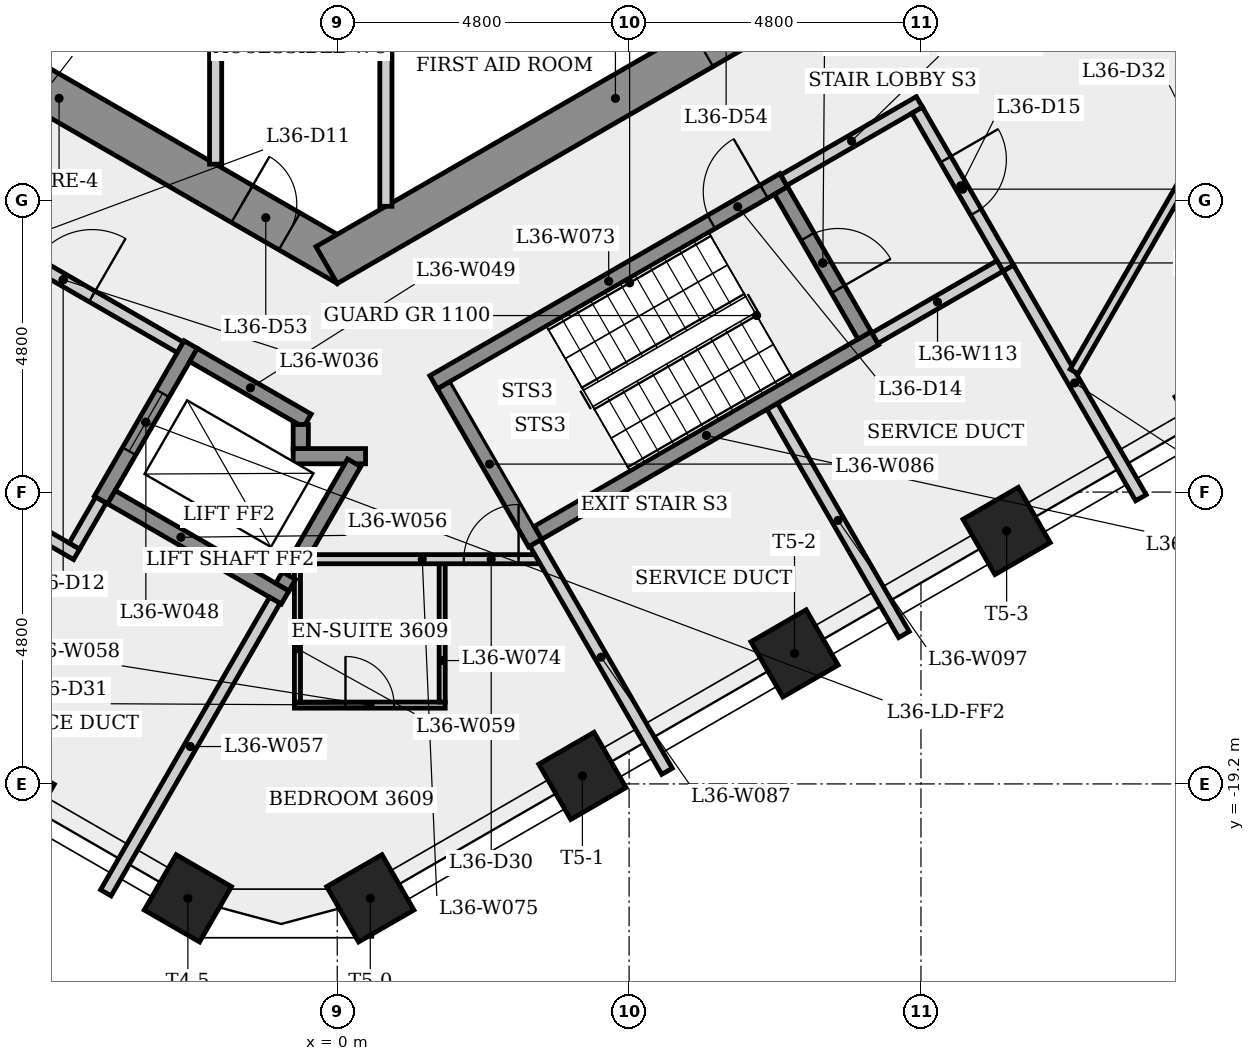
"""IFC4 building model, lengths in metres.
Left out: names, types, materials, properties, quantities, classifications, styles, units other than length and angle.
Written with IfcOpenShell. Run it as: python <this file> out.ifc"""

import sys

from ifc_helpers import new_model, si_unit, direction, frame, frame_2d, origin, origin_2d, place, context, subcontext, project, spatial, rectangle, extrude, element, fill, save


model = new_model("IFC4")
c1 = context("Model", 3, precision=1e-05, world=origin(), true_north=direction((0.0, 1.0)))
c2 = subcontext(c1, "Body", "Model", "MODEL_VIEW")
j1 = project(units=[si_unit("LENGTHUNIT", "METRE"), si_unit("PLANEANGLEUNIT", "RADIAN")], contexts=[c1])
p1 = place(None, origin())
s1 = spatial("IfcSite", under=j1, at=p1, CompositionType="ELEMENT")
p2 = place(p1, origin())
s2 = spatial("IfcBuilding", under=s1, at=p2, CompositionType="ELEMENT")
p3 = place(p2, frame((0.0, 0.0, 135.9)))
s3 = spatial("IfcBuildingStorey", under=s2, at=p3, CompositionType="ELEMENT", Elevation=135.9)
p4 = place(p3, frame((-9.325, -5.182, 0.0), z_axis=(0.0, 0.0, 1.0), x_axis=(0.866023993627, -0.500002442456, 0.0)))
e1 = element("IfcWall", 1, at=p4, inside=s3, PredefinedType="SHEAR", context=c2, shape_type="SweptSolid", body=[
    extrude(rectangle(XDim=10.97, YDim=0.7, at=frame_2d((5.485, 0.0))), origin(), (0.0, 0.0, 1.0), 4.0),
])
p5 = place(p4, frame((2.239, 0.0, 0.0)))
e2 = element("IfcOpeningElement", 2, at=p5, cuts=e1, PredefinedType="OPENING", context=c2, shape_type="SweptSolid", body=[
    extrude(rectangle(XDim=0.9, YDim=2.1, at=frame_2d((0.45, 1.05))), frame((0.0, 0.36, 0.0), z_axis=(0.0, -1.0, 0.0), x_axis=(1.0, 0.0, 0.0)), (0.0, 0.0, 1.0), 0.72),
])
p6 = place(p4, frame((8.96, 0.0, 0.0)))
e3 = element("IfcOpeningElement", 3, at=p6, cuts=e1, PredefinedType="OPENING", context=c2, shape_type="SweptSolid", body=[
    extrude(rectangle(XDim=0.9, YDim=2.1, at=frame_2d((0.45, 1.05))), frame((0.0, 0.36, 0.0), z_axis=(0.0, -1.0, 0.0), x_axis=(1.0, 0.0, 0.0)), (0.0, 0.0, 1.0), 0.72),
])
p7 = place(p3, frame((-0.175, -10.667, 0.0), z_axis=(0.0, 0.0, 1.0), x_axis=(0.866023993627, 0.500002442456, 0.0)))
e4 = element("IfcWall", 4, at=p7, inside=s3, PredefinedType="SHEAR", context=c2, shape_type="SweptSolid", body=[
    extrude(rectangle(XDim=10.97, YDim=0.7, at=frame_2d((5.485, 0.0))), origin(), (0.0, 0.0, 1.0), 4.0),
])
p8 = place(p7, frame((7.137, 0.0, 0.0)))
e5 = element("IfcOpeningElement", 5, at=p8, cuts=e4, PredefinedType="OPENING", context=c2, shape_type="SweptSolid", body=[
    extrude(rectangle(XDim=0.9, YDim=2.1, at=frame_2d((0.45, 1.05))), frame((0.0, 0.36, 0.0), z_axis=(0.0, -1.0, 0.0), x_axis=(1.0, 0.0, 0.0)), (0.0, 0.0, 1.0), 0.72),
])
for number, where, z_axis, x_axis in (
    (6, (-5.371, -19.399, 0.0), (0.0, 0.0, 1.0), (-0.5, -0.866, 0.0)),
    (7, (-2.457, -21.082, 0.0), (0.0, 0.0, 1.0), (-0.5, -0.866, 0.0)),
    (8, (0.543, -21.082, 0.0), (0.0, 0.0, 1.0), (0.5, -0.866, 0.0)),
    (9, (4.032, -19.068, 0.0), (0.0, 0.0, 1.0), (0.5, -0.866, 0.0)),
    (10, (7.52, -17.054, 0.0), (0.0, 0.0, 1.0), (0.5, -0.866, 0.0)),
    (11, (11.009, -15.04, 0.0), (0.0, 0.0, 1.0), (0.5, -0.866, 0.0)),
    (12, (14.497, -13.026, 0.0), (0.0, 0.0, 1.0), (0.5, -0.866, 0.0)),
):
    element("IfcColumn", number, at=place(p3, frame(where, z_axis=z_axis, x_axis=x_axis)), inside=s3, PredefinedType="COLUMN", context=c2, shape_type="SweptSolid", body=[
        extrude(rectangle(XDim=1.05, YDim=1.05, at=origin_2d()), origin(), (0.0, 0.0, 1.0), 4.0),
    ])
p9 = place(p3, frame((-8.356, -13.073, 0.0), z_axis=(0.0, 0.0, 1.0), x_axis=(0.866038532462, -0.499977259774, 0.0)))
e13 = element("IfcWall", 13, at=p9, inside=s3, PredefinedType="PLUMBINGWALL", context=c2, shape_type="SweptSolid", body=[
    extrude(rectangle(XDim=4.7, YDim=0.2, at=frame_2d((2.35, 0.0))), origin(), (0.0, 0.0, 1.0), 3.6),
])
p10 = place(p3, frame((-6.435, -9.795, 0.0), z_axis=(0.0, 0.0, 1.0), x_axis=(0.866012907634, -0.500021643343, 0.0)))
e14 = element("IfcWall", 14, at=p10, inside=s3, PredefinedType="PARTITIONING", context=c2, shape_type="SweptSolid", body=[
    extrude(rectangle(XDim=4.45, YDim=0.2, at=frame_2d((2.225, 0.0))), origin(), (0.0, 0.0, 1.0), 3.6),
])
p11 = place(p10, frame((1.675, 0.0, 0.0)))
e15 = element("IfcOpeningElement", 15, at=p11, cuts=e14, PredefinedType="OPENING", context=c2, shape_type="SweptSolid", body=[
    extrude(rectangle(XDim=1.1, YDim=2.1, at=frame_2d((0.55, 1.05))), frame((0.0, 0.11, 0.0), z_axis=(0.0, -1.0, 0.0), x_axis=(1.0, 0.0, 0.0)), (0.0, 0.0, 1.0), 0.22),
])
p12 = place(p3, frame((-3.885, -14.529, 0.0), z_axis=(0.0, 0.0, 1.0), x_axis=(-0.499859285417, -0.866106630146, 0.0)))
e16 = element("IfcWall", 16, at=p12, inside=s3, PredefinedType="PLUMBINGWALL", context=c2, shape_type="SweptSolid", body=[
    extrude(rectangle(XDim=0.875, YDim=0.2, at=frame_2d((0.438, 0.0))), origin(), (0.0, 0.0, 1.0), 3.6),
])
p13 = place(p3, frame((-2.41, -11.974, 0.0), z_axis=(0.0, 0.0, 1.0), x_axis=(-0.500001826776, -0.866024349092, 0.0)))
e17 = element("IfcWall", 17, at=p13, inside=s3, PredefinedType="SHEAR", context=c2, shape_type="SweptSolid", body=[
    extrude(rectangle(XDim=2.95, YDim=0.25, at=frame_2d((1.475, 0.0))), origin(), (0.0, 0.0, 1.0), 3.6),
])
p14 = place(p13, frame((0.925, 0.0, 0.0)))
e18 = element("IfcOpeningElement", 18, at=p14, cuts=e17, PredefinedType="OPENING", context=c2, shape_type="SweptSolid", body=[
    extrude(rectangle(XDim=1.1, YDim=2.1, at=frame_2d((0.55, 1.05))), frame((0.0, 0.135, 0.0), z_axis=(0.0, -1.0, 0.0), x_axis=(1.0, 0.0, 0.0)), (0.0, 0.0, 1.0), 0.27),
])
p15 = place(p3, frame((-2.364, -12.145, 0.0), z_axis=(0.0, 0.0, 1.0), x_axis=(0.86603892542, -0.499976579108, 0.0)))
e19 = element("IfcWall", 19, at=p15, inside=s3, PredefinedType="SHEAR", context=c2, shape_type="SweptSolid", body=[
    extrude(rectangle(XDim=2.162, YDim=0.25, at=frame_2d((1.081, 0.0))), origin(), (0.0, 0.0, 1.0), 3.6),
])
p16 = place(p3, frame((-2.0, -5.275, 0.0), z_axis=(0.0, 0.0, 1.0), x_axis=(0.0, -1.0, 0.0)))
e20 = element("IfcWall", 20, at=p16, inside=s3, PredefinedType="PARTITIONING", context=c2, shape_type="SweptSolid", body=[
    extrude(rectangle(XDim=3.732, YDim=0.2, at=frame_2d((1.866, 0.0))), origin(), (0.0, 0.0, 1.0), 3.6),
])
p17 = place(p3, frame((-0.856, -16.133, 0.0), z_axis=(0.0, 0.0, 1.0), x_axis=(-0.866021716278, 0.500006386895, 0.0)))
e21 = element("IfcWall", 21, at=p17, inside=s3, PredefinedType="SHEAR", context=c2, shape_type="SweptSolid", body=[
    extrude(rectangle(XDim=3.3, YDim=0.25, at=frame_2d((1.65, 0.0))), origin(), (0.0, 0.0, 1.0), 3.6),
])
p18 = place(p3, frame((-1.027, -16.179, 0.0), z_axis=(0.0, 0.0, 1.0), x_axis=(-0.499995019066, -0.866028279509, 0.0)))
e22 = element("IfcWall", 22, at=p18, inside=s3, PredefinedType="PLUMBINGWALL", context=c2, shape_type="SweptSolid", body=[
    extrude(rectangle(XDim=5.557, YDim=0.2, at=frame_2d((2.778, 0.0))), origin(), (0.0, 0.0, 1.0), 3.6),
])
p19 = place(p3, frame((-0.705, -17.904, 0.0), z_axis=(0.0, 0.0, 1.0), x_axis=(1.0, 0.0, 0.0)))
e23 = element("IfcWall", 23, at=p19, inside=s3, PredefinedType="PARTITIONING", context=c2, shape_type="SweptSolid", body=[
    extrude(rectangle(XDim=2.48, YDim=0.1, at=frame_2d((1.24, 0.0))), origin(), (0.0, 0.0, 1.0), 3.6),
])
p20 = place(p19, frame((0.84, 0.0, 0.0)))
e24 = element("IfcOpeningElement", 24, at=p20, cuts=e23, PredefinedType="OPENING", context=c2, shape_type="SweptSolid", body=[
    extrude(rectangle(XDim=0.8, YDim=2.1, at=frame_2d((0.4, 1.05))), frame((0.0, 0.06, 0.0), z_axis=(0.0, -1.0, 0.0), x_axis=(1.0, 0.0, 0.0)), (0.0, 0.0, 1.0), 0.12),
])
p21 = place(p3, frame((-0.655, -15.659, 0.0), z_axis=(0.0, 0.0, 1.0), x_axis=(0.0, -1.0, 0.0)))
e25 = element("IfcWall", 25, at=p21, inside=s3, PredefinedType="PARTITIONING", context=c2, shape_type="SweptSolid", body=[
    extrude(rectangle(XDim=2.195, YDim=0.1, at=frame_2d((1.098, 0.0))), origin(), (0.0, 0.0, 1.0), 3.6),
])
p22 = place(p3, frame((-0.794, -15.776, 0.0), z_axis=(0.0, 0.0, 1.0), x_axis=(-0.500409926597, -0.865788603161, 0.0)))
e26 = element("IfcWall", 26, at=p22, inside=s3, PredefinedType="SHEAR", context=c2, shape_type="SweptSolid", body=[
    extrude(rectangle(XDim=0.215, YDim=0.25, at=frame_2d((0.107, 0.0))), origin(), (0.0, 0.0, 1.0), 4.0),
])
p23 = place(p3, frame((-0.725, -13.81, 0.0), z_axis=(0.0, 0.0, 1.0), x_axis=(1.0, 0.0, 0.0)))
e27 = element("IfcWall", 27, at=p23, inside=s3, PredefinedType="SHEAR", context=c2, shape_type="SweptSolid", body=[
    extrude(rectangle(XDim=1.191, YDim=0.25, at=frame_2d((0.595, 0.0))), origin(), (0.0, 0.0, 1.0), 3.6),
])
p24 = place(p3, frame((-0.6, -13.289, 0.0), z_axis=(0.0, 0.0, 1.0), x_axis=(0.0, -1.0, 0.0)))
e28 = element("IfcWall", 28, at=p24, inside=s3, PredefinedType="SHEAR", context=c2, shape_type="SweptSolid", body=[
    extrude(rectangle(XDim=0.396, YDim=0.25, at=frame_2d((0.198, 0.0))), origin(), (0.0, 0.0, 1.0), 4.0),
])
p25 = place(p3, frame((0.278, -13.918, 0.0), z_axis=(0.0, 0.0, 1.0), x_axis=(-0.499955309825, -0.866051204132, 0.0)))
e29 = element("IfcWall", 29, at=p25, inside=s3, PredefinedType="SHEAR", context=c2, shape_type="SweptSolid", body=[
    extrude(rectangle(XDim=1.906, YDim=0.25, at=frame_2d((0.953, 0.0))), origin(), (0.0, 0.0, 1.0), 4.0),
])
p26 = place(p3, frame((0.8, -5.275, 0.0), z_axis=(0.0, 0.0, 1.0), x_axis=(0.0, -1.0, 0.0)))
e30 = element("IfcWall", 30, at=p26, inside=s3, PredefinedType="PARTITIONING", context=c2, shape_type="SweptSolid", body=[
    extrude(rectangle(XDim=4.425, YDim=0.2, at=frame_2d((2.212, 0.0))), origin(), (0.0, 0.0, 1.0), 3.6),
])
p27 = place(p3, frame((1.585, -12.595, 0.0), z_axis=(0.0, 0.0, 1.0), x_axis=(0.866036417653, 0.499980922934, 0.0)))
e31 = element("IfcWall", 31, at=p27, inside=s3, PredefinedType="SHEAR", context=c2, shape_type="SweptSolid", body=[
    extrude(rectangle(XDim=6.65, YDim=0.25, at=frame_2d((3.325, 0.0))), origin(), (0.0, 0.0, 1.0), 3.6),
])
p28 = place(p27, frame((5.275, 0.0, 0.0)))
e32 = element("IfcOpeningElement", 32, at=p28, cuts=e31, PredefinedType="OPENING", context=c2, shape_type="SweptSolid", body=[
    extrude(rectangle(XDim=1.0, YDim=2.1, at=frame_2d((0.5, 1.05))), frame((0.0, 0.135, 0.0), z_axis=(0.0, -1.0, 0.0), x_axis=(1.0, 0.0, 0.0)), (0.0, 0.0, 1.0), 0.27),
])
p29 = place(p3, frame((1.726, -17.854, 0.0), z_axis=(0.0, 0.0, 1.0), x_axis=(0.0, 1.0, 0.0)))
e33 = element("IfcWall", 33, at=p29, inside=s3, PredefinedType="PARTITIONING", context=c2, shape_type="SweptSolid", body=[
    extrude(rectangle(XDim=2.275, YDim=0.1, at=frame_2d((1.137, 0.0))), origin(), (0.0, 0.0, 1.0), 3.6),
])
p30 = place(p3, frame((-0.512, -15.504, 0.0), z_axis=(0.0, 0.0, 1.0), x_axis=(1.0, 0.0, 0.0)))
e34 = element("IfcWall", 34, at=p30, inside=s3, PredefinedType="PARTITIONING", context=c2, shape_type="SweptSolid", body=[
    extrude(rectangle(XDim=3.821, YDim=0.15, at=frame_2d((1.91, 0.0))), origin(), (0.0, 0.0, 1.0), 3.6),
])
p31 = place(p30, frame((2.594, 0.0, 0.0)))
e35 = element("IfcOpeningElement", 35, at=p31, cuts=e34, PredefinedType="OPENING", context=c2, shape_type="SweptSolid", body=[
    extrude(rectangle(XDim=0.9, YDim=2.1, at=frame_2d((0.45, 1.05))), frame((0.0, 0.085, 0.0), z_axis=(0.0, -1.0, 0.0), x_axis=(1.0, 0.0, 0.0)), (0.0, 0.0, 1.0), 0.17),
])
p32 = place(p3, frame((3.256, -15.239, 0.0), z_axis=(0.0, 0.0, 1.0), x_axis=(-0.50002537861, 0.866010750942, 0.0)))
e36 = element("IfcWall", 36, at=p32, inside=s3, PredefinedType="SHEAR", context=c2, shape_type="SweptSolid", body=[
    extrude(rectangle(XDim=3.0, YDim=0.25, at=frame_2d((1.5, 0.0))), origin(), (0.0, 0.0, 1.0), 3.6),
])
for number, where, z_axis, x_axis in (
    (37, (3.256, -15.239, 0.0), (0.0, 0.0, 1.0), (0.5, -0.866, 0.0)),
    (38, (7.153, -12.989, 0.0), (0.0, 0.0, 1.0), (0.5, -0.866, 0.0)),
):
    element("IfcWall", number, at=place(p3, frame(where, z_axis=z_axis, x_axis=x_axis)), inside=s3, PredefinedType="PLUMBINGWALL", context=c2, shape_type="SweptSolid", body=[
        extrude(rectangle(XDim=4.335, YDim=0.2, at=frame_2d((2.167, 0.0))), origin(), (0.0, 0.0, 1.0), 3.6),
    ])
p33 = place(p3, frame((3.301, -15.068, 0.0), z_axis=(0.0, 0.0, 1.0), x_axis=(0.866035036182, 0.499983315828, 0.0)))
e39 = element("IfcWall", 39, at=p33, inside=s3, PredefinedType="SHEAR", context=c2, shape_type="SweptSolid", body=[
    extrude(rectangle(XDim=6.4, YDim=0.25, at=frame_2d((3.2, 0.0))), origin(), (0.0, 0.0, 1.0), 4.0),
])
p34 = place(p3, frame((7.298, -9.441, 0.0), z_axis=(0.0, 0.0, 1.0), x_axis=(0.500034990121, -0.866005201286, 0.0)))
e40 = element("IfcWall", 40, at=p34, inside=s3, PredefinedType="SHEAR", context=c2, shape_type="SweptSolid", body=[
    extrude(rectangle(XDim=2.75, YDim=0.25, at=frame_2d((1.375, 0.0))), origin(), (0.0, 0.0, 1.0), 3.6),
])
p35 = place(p34, frame((0.875, 0.0, 0.0)))
e41 = element("IfcOpeningElement", 41, at=p35, cuts=e40, PredefinedType="OPENING", context=c2, shape_type="SweptSolid", body=[
    extrude(rectangle(XDim=1.0, YDim=2.1, at=frame_2d((0.5, 1.05))), frame((0.0, 0.135, 0.0), z_axis=(0.0, -1.0, 0.0), x_axis=(1.0, 0.0, 0.0)), (0.0, 0.0, 1.0), 0.27),
])
p36 = place(p3, frame((7.344, -9.27, 0.0), z_axis=(0.0, 0.0, 1.0), x_axis=(0.866005588531, 0.500034319456, 0.0)))
e42 = element("IfcWall", 42, at=p36, inside=s3, PredefinedType="PARTITIONING", context=c2, shape_type="SweptSolid", body=[
    extrude(rectangle(XDim=2.575, YDim=0.2, at=frame_2d((1.288, 0.0))), origin(), (0.0, 0.0, 1.0), 3.6),
])
p37 = place(p3, frame((9.537, -8.119, 0.0), z_axis=(0.0, 0.0, 1.0), x_axis=(0.499990139034, -0.866031096941, 0.0)))
e43 = element("IfcWall", 43, at=p37, inside=s3, PredefinedType="PARTITIONING", context=c2, shape_type="SweptSolid", body=[
    extrude(rectangle(XDim=3.0, YDim=0.2, at=frame_2d((1.5, 0.0))), origin(), (0.0, 0.0, 1.0), 3.6),
])
p38 = place(p37, frame((0.935, 0.0, 0.0)))
e44 = element("IfcOpeningElement", 44, at=p38, cuts=e43, PredefinedType="OPENING", context=c2, shape_type="SweptSolid", body=[
    extrude(rectangle(XDim=1.0, YDim=2.1, at=frame_2d((0.5, 1.05))), frame((0.0, 0.11, 0.0), z_axis=(0.0, -1.0, 0.0), x_axis=(1.0, 0.0, 0.0)), (0.0, 0.0, 1.0), 0.22),
])
p39 = place(p3, frame((11.037, -10.717, 0.0), z_axis=(0.0, 0.0, 1.0), x_axis=(0.50001167932, -0.866018660621, 0.0)))
e45 = element("IfcWall", 45, at=p39, inside=s3, PredefinedType="PLUMBINGWALL", context=c2, shape_type="SweptSolid", body=[
    extrude(rectangle(XDim=4.36, YDim=0.2, at=frame_2d((2.18, 0.0))), origin(), (0.0, 0.0, 1.0), 3.6),
])
p40 = place(p3, frame((10.901, -10.681, 0.0), z_axis=(0.0, 0.0, 1.0), x_axis=(-0.866007538022, -0.500030943131, 0.0)))
e46 = element("IfcWall", 46, at=p40, inside=s3, PredefinedType="PLUMBINGWALL", context=c2, shape_type="SweptSolid", body=[
    extrude(rectangle(XDim=2.375, YDim=0.2, at=frame_2d((1.188, 0.0))), origin(), (0.0, 0.0, 1.0), 3.6),
])
p41 = place(p3, frame((16.322, -5.137, 0.0), z_axis=(0.0, 0.0, 1.0), x_axis=(-0.49999983278, -0.866025500329, 0.0)))
e47 = element("IfcWall", 47, at=p41, inside=s3, PredefinedType="PARTITIONING", context=c2, shape_type="SweptSolid", body=[
    extrude(rectangle(XDim=8.406, YDim=0.15, at=frame_2d((4.203, 0.0))), origin(), (0.0, 0.0, 1.0), 3.6),
])
p42 = place(p41, frame((3.703, 0.0, 0.0)))
e48 = element("IfcOpeningElement", 48, at=p42, cuts=e47, PredefinedType="OPENING", context=c2, shape_type="SweptSolid", body=[
    extrude(rectangle(XDim=1.0, YDim=2.1, at=frame_2d((0.5, 1.05))), frame((0.0, 0.085, 0.0), z_axis=(0.0, -1.0, 0.0), x_axis=(1.0, 0.0, 0.0)), (0.0, 0.0, 1.0), 0.17),
])
p43 = place(p11, origin())
e49 = element("IfcDoor", 49, at=p43, inside=s3, OperationType="SINGLE_SWING_RIGHT", PredefinedType="DOOR", context=c2, shape_type="SweptSolid", body=[
    extrude(rectangle(XDim=1.1, YDim=2.1, at=frame_2d((0.55, 1.05))), frame((0.0, 0.025, 0.0), z_axis=(0.0, -1.0, 0.0), x_axis=(1.0, 0.0, 0.0)), (0.0, 0.0, 1.0), 0.05),
])
fill(e15, e49)
p44 = place(p14, origin())
e50 = element("IfcDoor", 50, at=p44, inside=s3, OperationType="SLIDING_TO_LEFT", PredefinedType="DOOR", context=c2, shape_type="SweptSolid", body=[
    extrude(rectangle(XDim=1.1, YDim=2.1, at=frame_2d((0.55, 1.05))), frame((0.0, 0.025, 0.0), z_axis=(0.0, -1.0, 0.0), x_axis=(1.0, 0.0, 0.0)), (0.0, 0.0, 1.0), 0.05),
])
fill(e18, e50)
p45 = place(p28, origin())
e51 = element("IfcDoor", 51, at=p45, inside=s3, OperationType="SINGLE_SWING_RIGHT", PredefinedType="DOOR", context=c2, shape_type="SweptSolid", body=[
    extrude(rectangle(XDim=1.0, YDim=2.1, at=frame_2d((0.5, 1.05))), frame((0.0, 0.025, 0.0), z_axis=(0.0, -1.0, 0.0), x_axis=(1.0, 0.0, 0.0)), (0.0, 0.0, 1.0), 0.05),
])
fill(e32, e51)
p46 = place(p38, origin())
e52 = element("IfcDoor", 52, at=p46, inside=s3, OperationType="SINGLE_SWING_LEFT", PredefinedType="DOOR", context=c2, shape_type="SweptSolid", body=[
    extrude(rectangle(XDim=1.0, YDim=2.1, at=frame_2d((0.5, 1.05))), frame((0.0, 0.025, 0.0), z_axis=(0.0, -1.0, 0.0), x_axis=(1.0, 0.0, 0.0)), (0.0, 0.0, 1.0), 0.05),
])
fill(e44, e52)
p47 = place(p35, origin())
e53 = element("IfcDoor", 53, at=p47, inside=s3, OperationType="SINGLE_SWING_RIGHT", PredefinedType="DOOR", context=c2, shape_type="SweptSolid", body=[
    extrude(rectangle(XDim=1.0, YDim=2.1, at=frame_2d((0.5, 1.05))), frame((0.0, 0.025, 0.0), z_axis=(0.0, -1.0, 0.0), x_axis=(1.0, 0.0, 0.0)), (0.0, 0.0, 1.0), 0.05),
])
fill(e41, e53)
p48 = place(p31, origin())
e54 = element("IfcDoor", 54, at=p48, inside=s3, OperationType="SINGLE_SWING_RIGHT", PredefinedType="DOOR", context=c2, shape_type="SweptSolid", body=[
    extrude(rectangle(XDim=0.9, YDim=2.1, at=frame_2d((0.45, 1.05))), frame((0.0, 0.025, 0.0), z_axis=(0.0, -1.0, 0.0), x_axis=(1.0, 0.0, 0.0)), (0.0, 0.0, 1.0), 0.05),
])
fill(e35, e54)
p49 = place(p20, origin())
e55 = element("IfcDoor", 55, at=p49, inside=s3, OperationType="SINGLE_SWING_LEFT", PredefinedType="DOOR", context=c2, shape_type="SweptSolid", body=[
    extrude(rectangle(XDim=0.8, YDim=2.1, at=frame_2d((0.4, 1.05))), frame((0.0, 0.025, 0.0), z_axis=(0.0, -1.0, 0.0), x_axis=(1.0, 0.0, 0.0)), (0.0, 0.0, 1.0), 0.05),
])
fill(e24, e55)
p50 = place(p6, origin())
e56 = element("IfcDoor", 56, at=p50, inside=s3, OperationType="SINGLE_SWING_LEFT", PredefinedType="DOOR", context=c2, shape_type="SweptSolid", body=[
    extrude(rectangle(XDim=0.9, YDim=2.1, at=frame_2d((0.45, 1.05))), frame((0.0, 0.025, 0.0), z_axis=(0.0, -1.0, 0.0), x_axis=(1.0, 0.0, 0.0)), (0.0, 0.0, 1.0), 0.05),
])
fill(e3, e56)
save(model, sys.argv[1])
